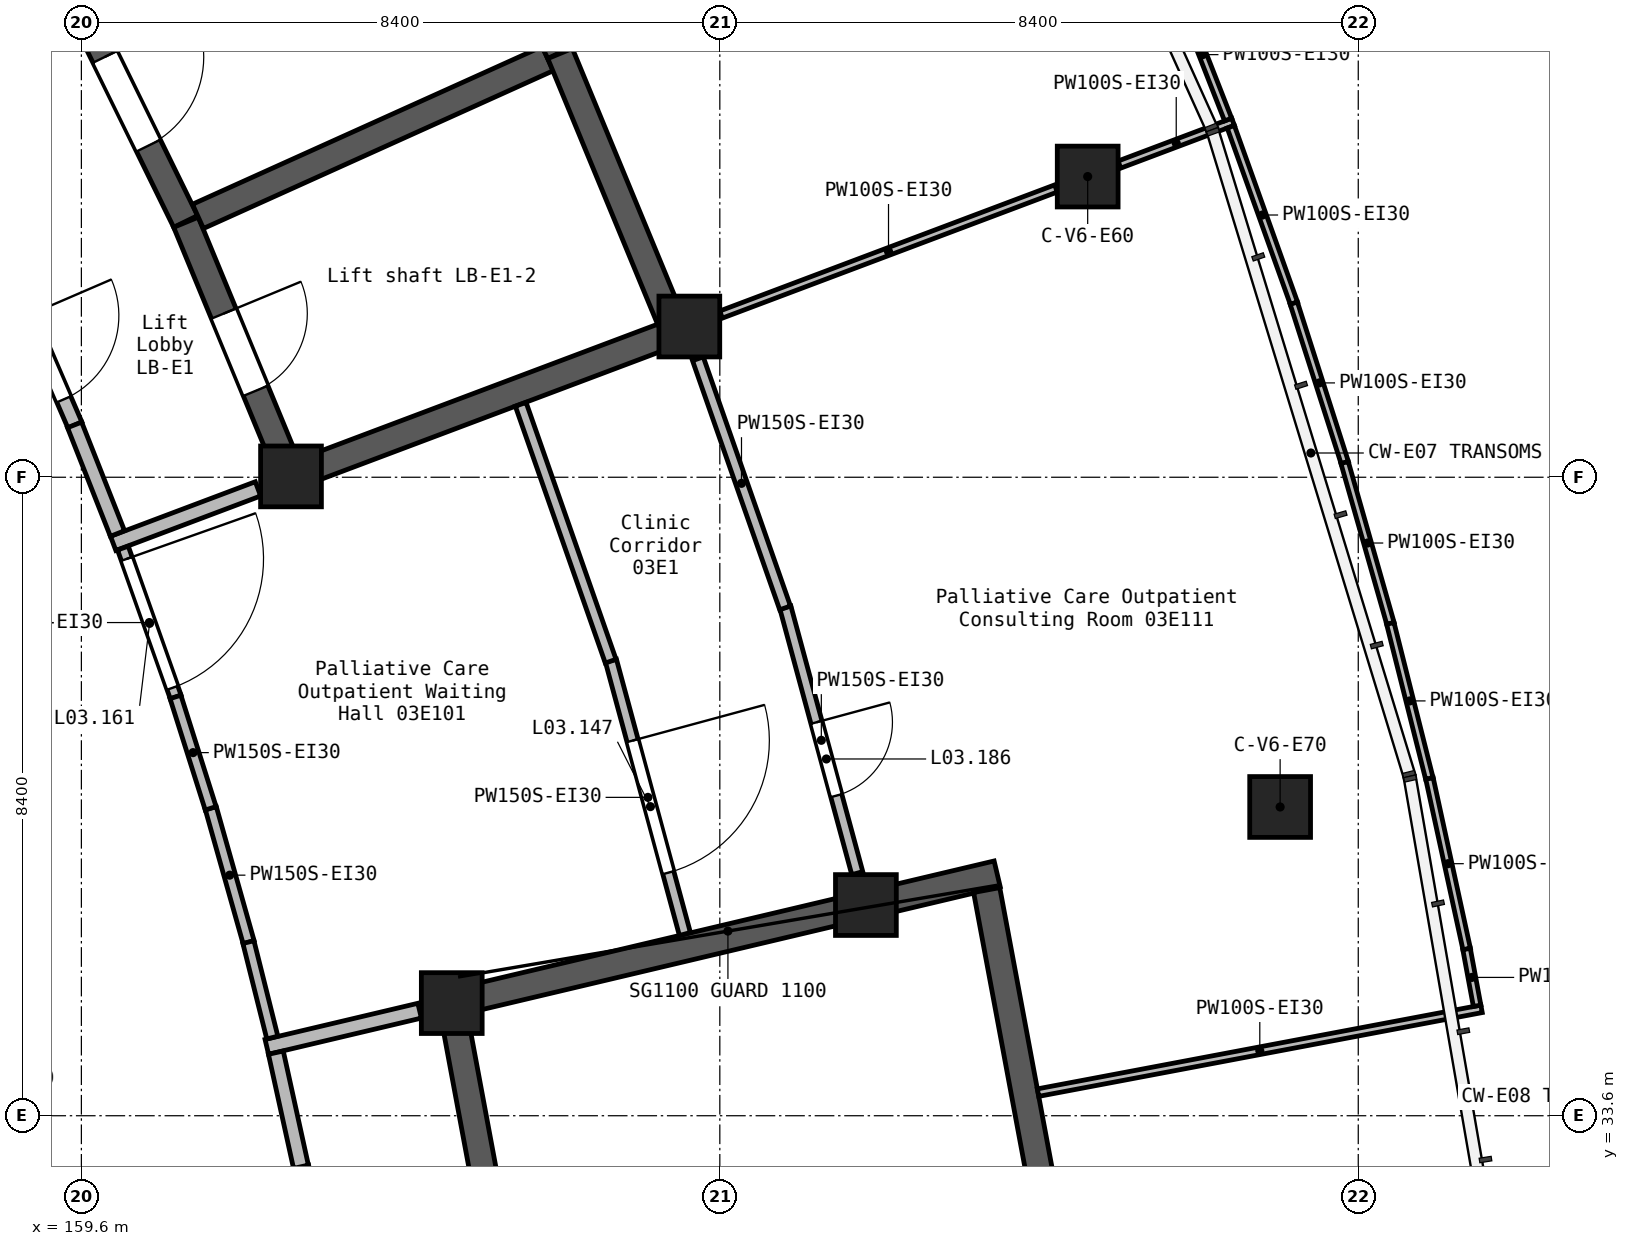
"""IFC4 building model, lengths in metres.
Left out: names, types, materials, properties, quantities, classifications, styles, units other than length and angle.
Written with IfcOpenShell. Run it as: python <this file> out.ifc"""

import sys

from ifc_helpers import new_model, si_unit, direction, frame, frame_2d, origin, origin_2d, place, context, subcontext, project, spatial, rectangle, extrude, element, fill, save


model = new_model("IFC4")
c1 = context("Model", 3, precision=1e-05, world=origin(), true_north=direction((0.0, 1.0)))
c2 = subcontext(c1, "Body", "Model", "MODEL_VIEW")
j1 = project(units=[si_unit("LENGTHUNIT", "METRE"), si_unit("PLANEANGLEUNIT", "RADIAN")], contexts=[c1])
p1 = place(None, origin())
s1 = spatial("IfcSite", under=j1, at=p1, CompositionType="ELEMENT")
p2 = place(p1, origin())
s2 = spatial("IfcBuilding", under=s1, at=p2, CompositionType="ELEMENT")
p3 = place(p2, frame((0.0, 0.0, 16.8)))
s3 = spatial("IfcBuildingStorey", under=s2, at=p3, CompositionType="ELEMENT", Elevation=16.8)
for number, where, z_axis, x_axis in (
    (1, (162.358, 42.011, 0.0), (0.0, 0.0, 1.0), (1.0, 0.0, 0.0)),
    (2, (164.473, 35.082, 0.0), (0.0, 0.0, 1.0), (1.0, 0.0, 0.0)),
    (3, (167.599, 43.983, 0.0), (0.0, 0.0, 1.0), (1.0, 0.0, 0.0)),
    (4, (169.922, 36.372, 0.0), (0.0, 0.0, 1.0), (1.0, 0.0, 0.0)),
    (5, (172.84, 45.956, 0.0), (0.0, 0.0, 1.0), (1.0, 0.0, 0.0)),
    (6, (175.372, 37.662, 0.0), (0.0, 0.0, 1.0), (1.0, 0.0, 0.0)),
):
    element("IfcColumn", number, at=place(p3, frame(where, z_axis=z_axis, x_axis=x_axis)), inside=s3, PredefinedType="COLUMN", context=c2, shape_type="SweptSolid", body=[
        extrude(rectangle(XDim=0.8, YDim=0.8, at=origin_2d()), origin(), (0.0, 0.0, 1.0), 4.2),
    ])
p4 = place(p3, frame((159.456, 48.456, 0.0), z_axis=(0.0, 0.0, 1.0), x_axis=(0.440221126053, -0.89788939195, 0.0)))
e7 = element("IfcWall", 7, at=p4, inside=s3, PredefinedType="SHEAR", context=c2, shape_type="SweptSolid", body=[
    extrude(rectangle(XDim=3.442, YDim=0.35, at=frame_2d((1.721, 0.0))), origin(), (0.0, 0.0, 1.0), 4.2),
])
p5 = place(p4, frame((1.031, 0.0, 0.0)))
e8 = element("IfcOpeningElement", 8, at=p5, cuts=e7, PredefinedType="OPENING", context=c2, shape_type="SweptSolid", body=[
    extrude(rectangle(XDim=1.3, YDim=2.1, at=frame_2d((0.65, 1.05))), frame((0.0, 0.185, 0.0), z_axis=(0.0, -1.0, 0.0), x_axis=(1.0, 0.0, 0.0)), (0.0, 0.0, 1.0), 0.37),
])
p6 = place(p3, frame((160.976, 45.355, 0.0), z_axis=(0.0, 0.0, 1.0), x_axis=(0.381990591944, -0.924166212143, 0.0)))
e9 = element("IfcWall", 9, at=p6, inside=s3, PredefinedType="SHEAR", context=c2, shape_type="SweptSolid", body=[
    extrude(rectangle(XDim=3.443, YDim=0.35, at=frame_2d((1.721, 0.0))), origin(), (0.0, 0.0, 1.0), 4.2),
])
p7 = place(p6, frame((1.3, 0.0, 0.0)))
e10 = element("IfcOpeningElement", 10, at=p7, cuts=e9, PredefinedType="OPENING", context=c2, shape_type="SweptSolid", body=[
    extrude(rectangle(XDim=1.1, YDim=2.1, at=frame_2d((0.55, 1.05))), frame((0.0, 0.185, 0.0), z_axis=(0.0, -1.0, 0.0), x_axis=(1.0, 0.0, 0.0)), (0.0, 0.0, 1.0), 0.37),
])
p8 = place(p3, frame((161.134, 45.432, 0.0), z_axis=(0.0, 0.0, 1.0), x_axis=(0.911564728385, 0.411156595427, 0.0)))
e11 = element("IfcWall", 11, at=p8, inside=s3, PredefinedType="SHEAR", context=c2, shape_type="SweptSolid", body=[
    extrude(rectangle(XDim=5.05, YDim=0.35, at=frame_2d((2.525, 0.0))), origin(), (0.0, 0.0, 1.0), 4.2),
])
p9 = place(p3, frame((162.194, 41.949, 0.0), z_axis=(0.0, 0.0, 1.0), x_axis=(0.935920223106, 0.352212061095, 0.0)))
e12 = element("IfcWall", 12, at=p9, inside=s3, PredefinedType="SHEAR", context=c2, shape_type="SweptSolid", body=[
    extrude(rectangle(XDim=5.75, YDim=0.35, at=frame_2d((2.875, 0.0))), origin(), (0.0, 0.0, 1.0), 4.2),
])
p10 = place(p3, frame((164.303, 35.042, 0.0), z_axis=(0.0, 0.0, 1.0), x_axis=(0.973093454504, 0.230410782737, 0.0)))
e13 = element("IfcWall", 13, at=p10, inside=s3, PredefinedType="SHEAR", context=c2, shape_type="SweptSolid", body=[
    extrude(rectangle(XDim=7.55, YDim=0.35, at=frame_2d((3.775, 0.0))), origin(), (0.0, 0.0, 1.0), 4.2),
])
p11 = place(p3, frame((165.469, 29.746, 0.0), z_axis=(0.0, 0.0, 1.0), x_axis=(-0.183471964923, 0.98302494276, 0.0)))
e14 = element("IfcWall", 14, at=p11, inside=s3, PredefinedType="SHEAR", context=c2, shape_type="SweptSolid", body=[
    extrude(rectangle(XDim=5.253, YDim=0.35, at=frame_2d((2.627, 0.0))), origin(), (0.0, 0.0, 1.0), 4.2),
])
p12 = place(p3, frame((165.894, 47.585, 0.0), z_axis=(0.0, 0.0, 1.0), x_axis=(-0.43992897418, 0.898032570499, 0.0)))
e15 = element("IfcWall", 15, at=p12, inside=s3, PredefinedType="SHEAR", context=c2, shape_type="SweptSolid", body=[
    extrude(rectangle(XDim=3.788, YDim=0.35, at=frame_2d((1.894, 0.0))), origin(), (0.0, 0.0, 1.0), 4.2),
])
p13 = place(p3, frame((167.345, 44.075, 0.0), z_axis=(0.0, 0.0, 1.0), x_axis=(-0.382046231428, 0.924143212415, 0.0)))
e16 = element("IfcWall", 16, at=p13, inside=s3, PredefinedType="SHEAR", context=c2, shape_type="SweptSolid", body=[
    extrude(rectangle(XDim=3.788, YDim=0.35, at=frame_2d((1.894, 0.0))), origin(), (0.0, 0.0, 1.0), 4.2),
])
p14 = place(p3, frame((172.602, 30.727, 0.0), z_axis=(0.0, 0.0, 1.0), x_axis=(-0.18353204361, 0.983013727762, 0.0)))
e17 = element("IfcWall", 17, at=p14, inside=s3, PredefinedType="SHEAR", context=c2, shape_type="SweptSolid", body=[
    extrude(rectangle(XDim=5.944, YDim=0.35, at=frame_2d((2.972, 0.0))), origin(), (0.0, 0.0, 1.0), 4.2),
])
p15 = place(p3, frame((162.04, 34.506, 0.0), z_axis=(0.0, 0.0, 1.0), x_axis=(0.973117236519, 0.230310321066, 0.0)))
e18 = element("IfcWall", 18, at=p15, inside=s3, PredefinedType="SOLIDWALL", context=c2, shape_type="SweptSolid", body=[
    extrude(rectangle(XDim=2.066, YDim=0.2, at=frame_2d((1.033, 0.0))), origin(), (0.0, 0.0, 1.0), 3.9),
])
p16 = place(p3, frame((160.018, 41.13, 0.0), z_axis=(0.0, 0.0, 1.0), x_axis=(0.935835444075, 0.352437259115, 0.0)))
e19 = element("IfcWall", 19, at=p16, inside=s3, PredefinedType="SOLIDWALL", context=c2, shape_type="SweptSolid", body=[
    extrude(rectangle(XDim=2.036, YDim=0.2, at=frame_2d((1.018, 0.0))), origin(), (0.0, 0.0, 1.0), 3.9),
])
p17 = place(p3, frame((158.747, 44.465, 0.0), z_axis=(0.0, 0.0, 1.0), x_axis=(0.396322487651, -0.918111368943, 0.0)))
e20 = element("IfcWall", 20, at=p17, inside=s3, PredefinedType="SOLIDWALL", context=c2, shape_type="SweptSolid", body=[
    extrude(rectangle(XDim=1.936, YDim=0.2, at=frame_2d((0.968, 0.0))), origin(), (0.0, 0.0, 1.0), 3.9),
])
p18 = place(p17, frame((0.368, 0.0, 0.0)))
e21 = element("IfcOpeningElement", 21, at=p18, cuts=e20, PredefinedType="OPENING", context=c2, shape_type="SweptSolid", body=[
    extrude(rectangle(XDim=1.2, YDim=2.1, at=frame_2d((0.6, 1.05))), frame((0.0, 0.11, 0.0), z_axis=(0.0, -1.0, 0.0), x_axis=(1.0, 0.0, 0.0)), (0.0, 0.0, 1.0), 0.22),
])
p19 = place(p3, frame((162.492, 32.932, 0.0), z_axis=(0.0, 0.0, 1.0), x_axis=(0.183778259652, -0.982967726469, 0.0)))
e22 = element("IfcWall", 22, at=p19, inside=s3, PredefinedType="SOLIDWALL", context=c2, shape_type="SweptSolid", body=[
    extrude(rectangle(XDim=1.936, YDim=0.2, at=frame_2d((0.968, 0.0))), origin(), (0.0, 0.0, 1.0), 3.9),
])
p20 = place(p19, frame((0.736, 0.0, 0.0)))
e23 = element("IfcOpeningElement", 23, at=p20, cuts=e22, PredefinedType="OPENING", context=c2, shape_type="SweptSolid", body=[
    extrude(rectangle(XDim=1.1, YDim=2.1, at=frame_2d((0.55, 1.05))), frame((0.0, 0.11, 0.0), z_axis=(0.0, -1.0, 0.0), x_axis=(1.0, 0.0, 0.0)), (0.0, 0.0, 1.0), 0.22),
])
p21 = place(p3, frame((162.159, 34.43, 0.0), z_axis=(0.0, 0.0, 1.0), x_axis=(0.215079958229, -0.976596442533, 0.0)))
e24 = element("IfcWall", 24, at=p21, inside=s3, PredefinedType="SOLIDWALL", context=c2, shape_type="SweptSolid", body=[
    extrude(rectangle(XDim=1.537, YDim=0.2, at=frame_2d((0.769, 0.0))), origin(), (0.0, 0.0, 1.0), 3.9),
])
p22 = place(p3, frame((159.51, 42.689, 0.0), z_axis=(0.0, 0.0, 1.0), x_axis=(0.367195475631, -0.930143796773, 0.0)))
e25 = element("IfcWall", 25, at=p22, inside=s3, PredefinedType="SOLIDWALL", context=c2, shape_type="SweptSolid", body=[
    extrude(rectangle(XDim=1.537, YDim=0.2, at=frame_2d((0.768, 0.0))), origin(), (0.0, 0.0, 1.0), 3.9),
])
p23 = place(p3, frame((168.862, 40.287, 0.0), z_axis=(0.0, 0.0, 1.0), x_axis=(0.261268938462, -0.965266047157, 0.0)))
e26 = element("IfcWall", 26, at=p23, inside=s3, PredefinedType="PARTITIONING", context=c2, shape_type="SweptSolid", body=[
    extrude(rectangle(XDim=3.622, YDim=0.15, at=frame_2d((1.811, 0.0))), origin(), (0.0, 0.0, 1.0), 3.9),
])
p24 = place(p23, frame((1.566, 0.0, 0.0)))
e27 = element("IfcOpeningElement", 27, at=p24, cuts=e26, PredefinedType="OPENING", context=c2, shape_type="SweptSolid", body=[
    extrude(rectangle(XDim=1.0, YDim=2.1, at=frame_2d((0.5, 1.05))), frame((0.0, 0.085, 0.0), z_axis=(0.0, -1.0, 0.0), x_axis=(1.0, 0.0, 0.0)), (0.0, 0.0, 1.0), 0.17),
])
p25 = place(p3, frame((167.711, 43.559, 0.0), z_axis=(0.0, 0.0, 1.0), x_axis=(0.330491338893, -0.9438090246, 0.0)))
e28 = element("IfcWall", 28, at=p25, inside=s3, PredefinedType="PARTITIONING", context=c2, shape_type="SweptSolid", body=[
    extrude(rectangle(XDim=3.473, YDim=0.15, at=frame_2d((1.736, 0.0))), origin(), (0.0, 0.0, 1.0), 3.9),
])
p26 = place(p3, frame((166.567, 39.586, 0.0), z_axis=(0.0, 0.0, 1.0), x_axis=(0.261225938755, -0.965277684877, 0.0)))
e29 = element("IfcWall", 29, at=p26, inside=s3, PredefinedType="PARTITIONING", context=c2, shape_type="SweptSolid", body=[
    extrude(rectangle(XDim=3.725, YDim=0.15, at=frame_2d((1.863, 0.0))), origin(), (0.0, 0.0, 1.0), 3.9),
])
p27 = place(p26, frame((1.089, 0.0, 0.0)))
e30 = element("IfcOpeningElement", 30, at=p27, cuts=e29, PredefinedType="OPENING", context=c2, shape_type="SweptSolid", body=[
    extrude(rectangle(XDim=1.8, YDim=2.1, at=frame_2d((0.9, 1.05))), frame((0.0, 0.085, 0.0), z_axis=(0.0, -1.0, 0.0), x_axis=(1.0, 0.0, 0.0)), (0.0, 0.0, 1.0), 0.17),
])
p28 = place(p3, frame((165.38, 42.96, 0.0), z_axis=(0.0, 0.0, 1.0), x_axis=(0.330508329073, -0.943803075018, 0.0)))
e31 = element("IfcWall", 31, at=p28, inside=s3, PredefinedType="PARTITIONING", context=c2, shape_type="SweptSolid", body=[
    extrude(rectangle(XDim=3.581, YDim=0.15, at=frame_2d((1.791, 0.0))), origin(), (0.0, 0.0, 1.0), 3.9),
])
p29 = place(p3, frame((160.146, 41.068, 0.0), z_axis=(0.0, 0.0, 1.0), x_axis=(0.334170983673, -0.942512468708, 0.0)))
e32 = element("IfcWall", 32, at=p29, inside=s3, PredefinedType="PARTITIONING", context=c2, shape_type="SweptSolid", body=[
    extrude(rectangle(XDim=2.079, YDim=0.15, at=frame_2d((1.04, 0.0))), origin(), (0.0, 0.0, 1.0), 3.9),
])
p30 = place(p29, frame((0.151, 0.0, 0.0)))
e33 = element("IfcOpeningElement", 33, at=p30, cuts=e32, PredefinedType="OPENING", context=c2, shape_type="SweptSolid", body=[
    extrude(rectangle(XDim=1.8, YDim=2.1, at=frame_2d((0.9, 1.05))), frame((0.0, 0.085, 0.0), z_axis=(0.0, -1.0, 0.0), x_axis=(1.0, 0.0, 0.0)), (0.0, 0.0, 1.0), 0.17),
])
p31 = place(p3, frame((161.302, 37.647, 0.0), z_axis=(0.0, 0.0, 1.0), x_axis=(0.271536076628, -0.962428261789, 0.0)))
e34 = element("IfcWall", 34, at=p31, inside=s3, PredefinedType="PARTITIONING", context=c2, shape_type="SweptSolid", body=[
    extrude(rectangle(XDim=1.833, YDim=0.15, at=frame_2d((0.917, 0.0))), origin(), (0.0, 0.0, 1.0), 3.9),
])
p32 = place(p3, frame((160.838, 39.11, 0.0), z_axis=(0.0, 0.0, 1.0), x_axis=(0.301321411033, -0.953522630698, 0.0)))
e35 = element("IfcWall", 35, at=p32, inside=s3, PredefinedType="PARTITIONING", context=c2, shape_type="SweptSolid", body=[
    extrude(rectangle(XDim=1.537, YDim=0.15, at=frame_2d((0.769, 0.0))), origin(), (0.0, 0.0, 1.0), 3.9),
])
p33 = place(p3, frame((161.798, 35.884, 0.0), z_axis=(0.0, 0.0, 1.0), x_axis=(0.243023571224, -0.970020383203, 0.0)))
e36 = element("IfcWall", 36, at=p33, inside=s3, PredefinedType="PARTITIONING", context=c2, shape_type="SweptSolid", body=[
    extrude(rectangle(XDim=1.295, YDim=0.15, at=frame_2d((0.647, 0.0))), origin(), (0.0, 0.0, 1.0), 3.9),
])
p34 = place(p3, frame((168.016, 44.14, 0.0), z_axis=(0.0, 0.0, 1.0), x_axis=(0.935850976525, 0.352396012659, 0.0)))
e37 = element("IfcWall", 37, at=p34, inside=s3, PredefinedType="PARTITIONING", context=c2, shape_type="SweptSolid", body=[
    extrude(rectangle(XDim=4.708, YDim=0.1, at=frame_2d((2.354, 0.0))), origin(), (0.0, 0.0, 1.0), 3.9),
])
p35 = place(p3, frame((173.257, 46.114, 0.0), z_axis=(0.0, 0.0, 1.0), x_axis=(0.93586999438, 0.35234550319, 0.0)))
e38 = element("IfcWall", 38, at=p35, inside=s3, PredefinedType="PARTITIONING", context=c2, shape_type="SweptSolid", body=[
    extrude(rectangle(XDim=1.598, YDim=0.1, at=frame_2d((0.799, 0.0))), origin(), (0.0, 0.0, 1.0), 3.9),
])
p36 = place(p3, frame((172.187, 33.904, 0.0), z_axis=(0.0, 0.0, 1.0), x_axis=(0.982613852835, 0.185661025037, 0.0)))
e39 = element("IfcWall", 39, at=p36, inside=s3, PredefinedType="PARTITIONING", context=c2, shape_type="SweptSolid", body=[
    extrude(rectangle(XDim=5.938, YDim=0.1, at=frame_2d((2.969, 0.0))), origin(), (0.0, 0.0, 1.0), 3.9),
])
p37 = place(p3, frame((174.723, 46.611, 0.0), z_axis=(0.0, 0.0, 1.0), x_axis=(0.336762779461, -0.94158952329, 0.0)))
e40 = element("IfcWall", 40, at=p37, inside=s3, PredefinedType="PARTITIONING", context=c2, shape_type="SweptSolid", body=[
    extrude(rectangle(XDim=2.466, YDim=0.1, at=frame_2d((1.233, 0.0))), origin(), (0.0, 0.0, 1.0), 3.9),
])
p38 = place(p3, frame((177.336, 38.04, 0.0), z_axis=(0.0, 0.0, 1.0), x_axis=(0.213187334012, -0.977011341089, 0.0)))
e41 = element("IfcWall", 41, at=p38, inside=s3, PredefinedType="PARTITIONING", context=c2, shape_type="SweptSolid", body=[
    extrude(rectangle(XDim=2.301, YDim=0.1, at=frame_2d((1.15, 0.0))), origin(), (0.0, 0.0, 1.0), 3.9),
])
p39 = place(p3, frame((175.552, 44.29, 0.0), z_axis=(0.0, 0.0, 1.0), x_axis=(0.304461914253, -0.952524510325, 0.0)))
e42 = element("IfcWall", 42, at=p39, inside=s3, PredefinedType="PARTITIONING", context=c2, shape_type="SweptSolid", body=[
    extrude(rectangle(XDim=2.202, YDim=0.1, at=frame_2d((1.101, 0.0))), origin(), (0.0, 0.0, 1.0), 3.9),
])
p40 = place(p3, frame((176.22, 42.193, 0.0), z_axis=(0.0, 0.0, 1.0), x_axis=(0.274105977671, -0.961699492048, 0.0)))
e43 = element("IfcWall", 43, at=p40, inside=s3, PredefinedType="PARTITIONING", context=c2, shape_type="SweptSolid", body=[
    extrude(rectangle(XDim=2.202, YDim=0.1, at=frame_2d((1.101, 0.0))), origin(), (0.0, 0.0, 1.0), 3.9),
])
p41 = place(p3, frame((176.822, 40.077, 0.0), z_axis=(0.0, 0.0, 1.0), x_axis=(0.244201941447, -0.969724399917, 0.0)))
e44 = element("IfcWall", 44, at=p41, inside=s3, PredefinedType="PARTITIONING", context=c2, shape_type="SweptSolid", body=[
    extrude(rectangle(XDim=2.103, YDim=0.1, at=frame_2d((1.051, 0.0))), origin(), (0.0, 0.0, 1.0), 3.9),
])
p42 = place(p3, frame((174.02, 48.414, 0.0), z_axis=(0.0, 0.0, 1.0), x_axis=(0.364148326517, -0.931340966722, 0.0)))
e45 = element("IfcWall", 45, at=p42, inside=s3, PredefinedType="PARTITIONING", context=c2, shape_type="SweptSolid", body=[
    extrude(rectangle(XDim=1.834, YDim=0.1, at=frame_2d((0.917, 0.0))), origin(), (0.0, 0.0, 1.0), 3.9),
])
p43 = place(p3, frame((177.825, 35.793, 0.0), z_axis=(0.0, 0.0, 1.0), x_axis=(0.18287179521, -0.983136768978, 0.0)))
e46 = element("IfcWall", 46, at=p43, inside=s3, PredefinedType="PARTITIONING", context=c2, shape_type="SweptSolid", body=[
    extrude(rectangle(XDim=0.76, YDim=0.1, at=frame_2d((0.38, 0.0))), origin(), (0.0, 0.0, 1.0), 3.9),
])
p44 = place(p27, origin())
e47 = element("IfcDoor", 47, at=p44, inside=s3, OperationType="DOUBLE_DOOR_SINGLE_SWING", PredefinedType="DOOR", context=c2, shape_type="SweptSolid", body=[
    extrude(rectangle(XDim=1.8, YDim=2.1, at=frame_2d((0.9, 1.05))), frame((0.0, 0.025, 0.0), z_axis=(0.0, -1.0, 0.0), x_axis=(1.0, 0.0, 0.0)), (0.0, 0.0, 1.0), 0.05),
])
fill(e30, e47)
p45 = place(p18, origin())
e48 = element("IfcDoor", 48, at=p45, inside=s3, OperationType="SINGLE_SWING_LEFT", PredefinedType="DOOR", context=c2, shape_type="SweptSolid", body=[
    extrude(rectangle(XDim=1.2, YDim=2.1, at=frame_2d((0.6, 1.05))), frame((0.0, 0.025, 0.0), z_axis=(0.0, -1.0, 0.0), x_axis=(1.0, 0.0, 0.0)), (0.0, 0.0, 1.0), 0.05),
])
fill(e21, e48)
p46 = place(p30, frame((1.8, 0.0, 0.0), z_axis=(0.0, 0.0, 1.0), x_axis=(-1.0, 0.0, 0.0)))
e49 = element("IfcDoor", 49, at=p46, inside=s3, OperationType="DOUBLE_DOOR_SINGLE_SWING", PredefinedType="DOOR", context=c2, shape_type="SweptSolid", body=[
    extrude(rectangle(XDim=1.8, YDim=2.1, at=frame_2d((0.9, 1.05))), frame((0.0, 0.025, 0.0), z_axis=(0.0, -1.0, 0.0), x_axis=(1.0, 0.0, 0.0)), (0.0, 0.0, 1.0), 0.05),
])
fill(e33, e49)
p47 = place(p24, origin())
e50 = element("IfcDoor", 50, at=p47, inside=s3, OperationType="SINGLE_SWING_RIGHT", PredefinedType="DOOR", context=c2, shape_type="SweptSolid", body=[
    extrude(rectangle(XDim=1.0, YDim=2.1, at=frame_2d((0.5, 1.05))), frame((0.0, 0.025, 0.0), z_axis=(0.0, -1.0, 0.0), x_axis=(1.0, 0.0, 0.0)), (0.0, 0.0, 1.0), 0.05),
])
fill(e27, e50)
p48 = place(p5, origin())
e51 = element("IfcDoor", 51, at=p48, inside=s3, OperationType="DOUBLE_DOOR_SLIDING", PredefinedType="DOOR", context=c2, shape_type="SweptSolid", body=[
    extrude(rectangle(XDim=1.3, YDim=2.1, at=frame_2d((0.65, 1.05))), frame((0.0, 0.025, 0.0), z_axis=(0.0, -1.0, 0.0), x_axis=(1.0, 0.0, 0.0)), (0.0, 0.0, 1.0), 0.05),
])
fill(e8, e51)
p49 = place(p7, origin())
e52 = element("IfcDoor", 52, at=p49, inside=s3, OperationType="DOUBLE_DOOR_SLIDING", PredefinedType="DOOR", context=c2, shape_type="SweptSolid", body=[
    extrude(rectangle(XDim=1.1, YDim=2.1, at=frame_2d((0.55, 1.05))), frame((0.0, 0.025, 0.0), z_axis=(0.0, -1.0, 0.0), x_axis=(1.0, 0.0, 0.0)), (0.0, 0.0, 1.0), 0.05),
])
fill(e10, e52)
save(model, sys.argv[1])
